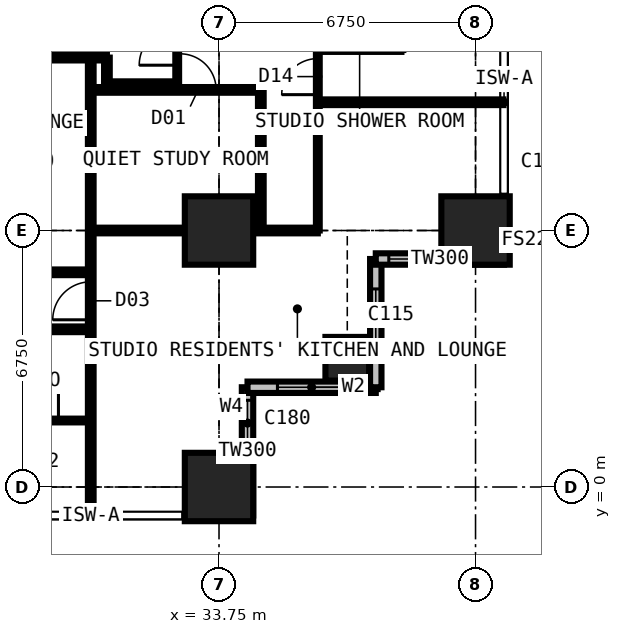
"""IFC4 building model, lengths in metres.
Left out: names, types, materials, properties, quantities, classifications, styles, units other than length and angle.
Written with IfcOpenShell. Run it as: python <this file> out.ifc"""

import sys

from ifc_helpers import new_model, si_unit, direction, frame, frame_2d, origin, origin_2d, place, context, subcontext, project, spatial, rectangle, extrude, element, fill, save


model = new_model("IFC4")
c1 = context("Model", 3, precision=1e-05, world=origin(), true_north=direction((0.0, 1.0)))
c2 = subcontext(c1, "Body", "Model", "MODEL_VIEW")
j1 = project(units=[si_unit("LENGTHUNIT", "METRE"), si_unit("PLANEANGLEUNIT", "RADIAN")], contexts=[c1])
p1 = place(None, origin())
s1 = spatial("IfcSite", under=j1, at=p1, CompositionType="ELEMENT")
p2 = place(p1, origin())
s2 = spatial("IfcBuilding", under=s1, at=p2, CompositionType="ELEMENT")
p3 = place(p2, frame((0.0, 0.0, 50.4)))
s3 = spatial("IfcBuildingStorey", under=s2, at=p3, CompositionType="ELEMENT", Elevation=50.4)
for number, where, z_axis, x_axis in (
    (1, (33.75, 0.0, 0.0), (0.0, 0.0, 1.0), (1.0, 0.0, 0.0)),
    (2, (33.75, 6.75, 0.0), (0.0, 0.0, 1.0), (1.0, 0.0, 0.0)),
):
    element("IfcColumn", number, at=place(p3, frame(where, z_axis=z_axis, x_axis=x_axis)), inside=s3, PredefinedType="COLUMN", context=c2, shape_type="SweptSolid", body=[
        extrude(rectangle(XDim=1.8, YDim=1.8, at=origin_2d()), origin(), (0.0, 0.0, 1.0), 3.6),
    ])
p4 = place(p3, frame((37.125, 3.375, 0.0), z_axis=(0.0, 0.0, 1.0), x_axis=(1.0, 0.0, 0.0)))
e3 = element("IfcColumn", 3, at=p4, inside=s3, PredefinedType="COLUMN", context=c2, shape_type="SweptSolid", body=[
    extrude(rectangle(XDim=1.15, YDim=1.15, at=origin_2d()), origin(), (0.0, 0.0, 1.0), 3.6),
])
p5 = place(p3, frame((40.5, 6.75, 0.0), z_axis=(0.0, 0.0, 1.0), x_axis=(1.0, 0.0, 0.0)))
e4 = element("IfcColumn", 4, at=p5, inside=s3, PredefinedType="COLUMN", context=c2, shape_type="SweptSolid", body=[
    extrude(rectangle(XDim=1.8, YDim=1.8, at=origin_2d()), origin(), (0.0, 0.0, 1.0), 3.6),
])
p6 = place(p3, frame((34.5, -0.75, 0.0), z_axis=(0.0, 0.0, 1.0), x_axis=(0.0, 1.0, 0.0)))
e5 = element("IfcWall", 5, at=p6, inside=s3, PredefinedType="SOLIDWALL", context=c2, shape_type="SweptSolid", body=[
    extrude(rectangle(XDim=3.375, YDim=0.3, at=frame_2d((1.688, 0.0))), origin(), (0.0, 0.0, 1.0), 3.375),
])
p7 = place(p6, frame((1.833, 0.0, 0.9)))
e6 = element("IfcOpeningElement", 6, at=p7, cuts=e5, PredefinedType="OPENING", context=c2, shape_type="SweptSolid", body=[
    extrude(rectangle(XDim=1.2, YDim=1.8, at=frame_2d((0.6, 0.9))), frame((0.0, 0.16, 0.0), z_axis=(0.0, -1.0, 0.0), x_axis=(1.0, 0.0, 0.0)), (0.0, 0.0, 1.0), 0.32),
])
p8 = place(p3, frame((34.5, 2.625, 0.0), z_axis=(0.0, 0.0, 1.0), x_axis=(1.0, 0.0, 0.0)))
e7 = element("IfcWall", 7, at=p8, inside=s3, PredefinedType="SOLIDWALL", context=c2, shape_type="SweptSolid", body=[
    extrude(rectangle(XDim=3.375, YDim=0.3, at=frame_2d((1.688, 0.0))), origin(), (0.0, 0.0, 1.0), 3.375),
])
p9 = place(p8, frame((0.788, 0.0, 0.6)))
e8 = element("IfcOpeningElement", 8, at=p9, cuts=e7, PredefinedType="OPENING", context=c2, shape_type="SweptSolid", body=[
    extrude(rectangle(XDim=1.8, YDim=2.1, at=frame_2d((0.9, 1.05))), frame((0.0, 0.16, 0.0), z_axis=(0.0, -1.0, 0.0), x_axis=(1.0, 0.0, 0.0)), (0.0, 0.0, 1.0), 0.32),
])
p10 = place(p3, frame((37.875, 2.625, 0.0), z_axis=(0.0, 0.0, 1.0), x_axis=(0.0, 1.0, 0.0)))
e9 = element("IfcWall", 9, at=p10, inside=s3, PredefinedType="SOLIDWALL", context=c2, shape_type="SweptSolid", body=[
    extrude(rectangle(XDim=3.375, YDim=0.3, at=frame_2d((1.688, 0.0))), origin(), (0.0, 0.0, 1.0), 3.375),
])
p11 = place(p10, frame((0.788, 0.0, 0.6)))
e10 = element("IfcOpeningElement", 10, at=p11, cuts=e9, PredefinedType="OPENING", context=c2, shape_type="SweptSolid", body=[
    extrude(rectangle(XDim=1.8, YDim=2.1, at=frame_2d((0.9, 1.05))), frame((0.0, 0.16, 0.0), z_axis=(0.0, -1.0, 0.0), x_axis=(1.0, 0.0, 0.0)), (0.0, 0.0, 1.0), 0.32),
])
p12 = place(p3, frame((37.875, 6.0, 0.0), z_axis=(0.0, 0.0, 1.0), x_axis=(1.0, 0.0, 0.0)))
e11 = element("IfcWall", 11, at=p12, inside=s3, PredefinedType="SOLIDWALL", context=c2, shape_type="SweptSolid", body=[
    extrude(rectangle(XDim=3.375, YDim=0.3, at=frame_2d((1.688, 0.0))), origin(), (0.0, 0.0, 1.0), 3.375),
])
p13 = place(p12, frame((0.343, 0.0, 0.9)))
e12 = element("IfcOpeningElement", 12, at=p13, cuts=e11, PredefinedType="OPENING", context=c2, shape_type="SweptSolid", body=[
    extrude(rectangle(XDim=1.2, YDim=1.8, at=frame_2d((0.6, 0.9))), frame((0.0, 0.16, 0.0), z_axis=(0.0, -1.0, 0.0), x_axis=(1.0, 0.0, 0.0)), (0.0, 0.0, 1.0), 0.32),
])
p14 = place(p3, frame((6.75, 4.15, 0.0), z_axis=(0.0, 0.0, 1.0), x_axis=(1.0, 0.0, 0.0)))
e13 = element("IfcWall", 13, at=p14, inside=s3, PredefinedType="PARTITIONING", context=c2, shape_type="SweptSolid", body=[
    extrude(rectangle(XDim=23.625, YDim=0.15, at=frame_2d((11.812, 0.0))), origin(), (0.0, 0.0, 1.0), 3.375),
])
p15 = place(p14, frame((0.2, 0.0, 0.0)))
e14 = element("IfcOpeningElement", 14, at=p15, cuts=e13, PredefinedType="OPENING", context=c2, shape_type="SweptSolid", body=[
    extrude(rectangle(XDim=0.95, YDim=2.2, at=frame_2d((0.475, 1.1))), frame((0.0, 0.085, 0.0), z_axis=(0.0, -1.0, 0.0), x_axis=(1.0, 0.0, 0.0)), (0.0, 0.0, 1.0), 0.17),
])
p16 = place(p14, frame((3.625, 0.0, 0.0)))
e15 = element("IfcOpeningElement", 15, at=p16, cuts=e13, PredefinedType="OPENING", context=c2, shape_type="SweptSolid", body=[
    extrude(rectangle(XDim=0.95, YDim=2.2, at=frame_2d((0.475, 1.1))), frame((0.0, 0.085, 0.0), z_axis=(0.0, -1.0, 0.0), x_axis=(1.0, 0.0, 0.0)), (0.0, 0.0, 1.0), 0.17),
])
p17 = place(p14, frame((18.475, 0.0, 0.0)))
e16 = element("IfcOpeningElement", 16, at=p17, cuts=e13, PredefinedType="OPENING", context=c2, shape_type="SweptSolid", body=[
    extrude(rectangle(XDim=0.95, YDim=2.2, at=frame_2d((0.475, 1.1))), frame((0.0, 0.085, 0.0), z_axis=(0.0, -1.0, 0.0), x_axis=(1.0, 0.0, 0.0)), (0.0, 0.0, 1.0), 0.17),
])
p18 = place(p14, frame((11.725, 0.0, 0.0)))
e17 = element("IfcOpeningElement", 17, at=p18, cuts=e13, PredefinedType="OPENING", context=c2, shape_type="SweptSolid", body=[
    extrude(rectangle(XDim=0.95, YDim=2.2, at=frame_2d((0.475, 1.1))), frame((0.0, 0.085, 0.0), z_axis=(0.0, -1.0, 0.0), x_axis=(1.0, 0.0, 0.0)), (0.0, 0.0, 1.0), 0.17),
])
p19 = place(p14, frame((6.95, 0.0, 0.0)))
e18 = element("IfcOpeningElement", 18, at=p19, cuts=e13, PredefinedType="OPENING", context=c2, shape_type="SweptSolid", body=[
    extrude(rectangle(XDim=0.95, YDim=2.2, at=frame_2d((0.475, 1.1))), frame((0.0, 0.085, 0.0), z_axis=(0.0, -1.0, 0.0), x_axis=(1.0, 0.0, 0.0)), (0.0, 0.0, 1.0), 0.17),
])
p20 = place(p3, frame((10.125, 11.3, 0.0), z_axis=(0.0, 0.0, 1.0), x_axis=(1.0, 0.0, 0.0)))
e19 = element("IfcWall", 19, at=p20, inside=s3, PredefinedType="PARTITIONING", context=c2, shape_type="SweptSolid", body=[
    extrude(rectangle(XDim=20.675, YDim=0.15, at=frame_2d((10.337, 0.0))), origin(), (0.0, 0.0, 1.0), 3.375),
])
p21 = place(p20, frame((1.775, 0.0, 0.0)))
e20 = element("IfcOpeningElement", 20, at=p21, cuts=e19, PredefinedType="OPENING", context=c2, shape_type="SweptSolid", body=[
    extrude(rectangle(XDim=1.0, YDim=2.2, at=frame_2d((0.5, 1.1))), frame((0.0, 0.085, 0.0), z_axis=(0.0, -1.0, 0.0), x_axis=(1.0, 0.0, 0.0)), (0.0, 0.0, 1.0), 0.17),
])
p22 = place(p20, frame((11.312, 0.0, 0.0)))
e21 = element("IfcOpeningElement", 21, at=p22, cuts=e19, PredefinedType="OPENING", context=c2, shape_type="SweptSolid", body=[
    extrude(rectangle(XDim=1.0, YDim=2.2, at=frame_2d((0.5, 1.1))), frame((0.0, 0.085, 0.0), z_axis=(0.0, -1.0, 0.0), x_axis=(1.0, 0.0, 0.0)), (0.0, 0.0, 1.0), 0.17),
])
p23 = place(p3, frame((22.988, 5.65, 0.0), z_axis=(0.0, 0.0, 1.0), x_axis=(1.0, 0.0, 0.0)))
e22 = element("IfcWall", 22, at=p23, inside=s3, PredefinedType="PARTITIONING", context=c2, shape_type="SweptSolid", body=[
    extrude(rectangle(XDim=7.387, YDim=0.15, at=frame_2d((3.694, 0.0))), origin(), (0.0, 0.0, 1.0), 3.375),
])
p24 = place(p23, frame((2.15, 0.0, 0.0)))
e23 = element("IfcOpeningElement", 23, at=p24, cuts=e22, PredefinedType="OPENING", context=c2, shape_type="SweptSolid", body=[
    extrude(rectangle(XDim=0.95, YDim=2.2, at=frame_2d((0.475, 1.1))), frame((0.0, 0.085, 0.0), z_axis=(0.0, -1.0, 0.0), x_axis=(1.0, 0.0, 0.0)), (0.0, 0.0, 1.0), 0.17),
])
p25 = place(p3, frame((27.775, 1.75, 0.0), z_axis=(0.0, 0.0, 1.0), x_axis=(1.0, 0.0, 0.0)))
e24 = element("IfcWall", 24, at=p25, inside=s3, PredefinedType="PARTITIONING", context=c2, shape_type="SweptSolid", body=[
    extrude(rectangle(XDim=2.6, YDim=0.1, at=frame_2d((1.3, 0.0))), origin(), (0.0, 0.0, 1.0), 3.375),
])
p26 = place(p25, frame((0.85, 0.0, 0.0)))
e25 = element("IfcOpeningElement", 25, at=p26, cuts=e24, PredefinedType="OPENING", context=c2, shape_type="SweptSolid", body=[
    extrude(rectangle(XDim=0.9, YDim=2.2, at=frame_2d((0.45, 1.1))), frame((0.0, 0.06, 0.0), z_axis=(0.0, -1.0, 0.0), x_axis=(1.0, 0.0, 0.0)), (0.0, 0.0, 1.0), 0.12),
])
p27 = place(p3, frame((30.375, -0.734, 0.0), z_axis=(0.0, 0.0, 1.0), x_axis=(0.0, 1.0, 0.0)))
e26 = element("IfcWall", 26, at=p27, inside=s3, PredefinedType="PARTITIONING", context=c2, shape_type="SweptSolid", body=[
    extrude(rectangle(XDim=12.034, YDim=0.15, at=frame_2d((6.017, 0.0))), origin(), (0.0, 0.0, 1.0), 3.375),
])
p28 = place(p27, frame((5.134, 0.0, 0.0)))
e27 = element("IfcOpeningElement", 27, at=p28, cuts=e26, PredefinedType="OPENING", context=c2, shape_type="SweptSolid", body=[
    extrude(rectangle(XDim=1.0, YDim=2.2, at=frame_2d((0.5, 1.1))), frame((0.0, 0.085, 0.0), z_axis=(0.0, -1.0, 0.0), x_axis=(1.0, 0.0, 0.0)), (0.0, 0.0, 1.0), 0.17),
])
p29 = place(p3, frame((30.375, 6.75, 0.0), z_axis=(0.0, 0.0, 1.0), x_axis=(1.0, 0.0, 0.0)))
e28 = element("IfcWall", 28, at=p29, inside=s3, PredefinedType="PARTITIONING", context=c2, shape_type="SweptSolid", body=[
    extrude(rectangle(XDim=5.975, YDim=0.15, at=frame_2d((2.988, 0.0))), origin(), (0.0, 0.0, 1.0), 2.877),
])
p30 = place(p3, frame((30.375, 10.45, 0.0), z_axis=(0.0, 0.0, 1.0), x_axis=(1.0, 0.0, 0.0)))
e29 = element("IfcWall", 29, at=p30, inside=s3, PredefinedType="PARTITIONING", context=c2, shape_type="SweptSolid", body=[
    extrude(rectangle(XDim=4.475, YDim=0.15, at=frame_2d((2.238, 0.0))), origin(), (0.0, 0.0, 1.0), 3.375),
])
p31 = place(p30, frame((2.35, 0.0, 0.0)))
e30 = element("IfcOpeningElement", 30, at=p31, cuts=e29, PredefinedType="OPENING", context=c2, shape_type="SweptSolid", body=[
    extrude(rectangle(XDim=0.95, YDim=2.2, at=frame_2d((0.475, 1.1))), frame((0.0, 0.085, 0.0), z_axis=(0.0, -1.0, 0.0), x_axis=(1.0, 0.0, 0.0)), (0.0, 0.0, 1.0), 0.17),
])
p32 = place(p3, frame((30.8, 10.6, 0.0), z_axis=(0.0, 0.0, 1.0), x_axis=(0.0, 1.0, 0.0)))
e31 = element("IfcWall", 31, at=p32, inside=s3, PredefinedType="PARTITIONING", context=c2, shape_type="SweptSolid", body=[
    extrude(rectangle(XDim=0.7, YDim=0.15, at=frame_2d((0.35, 0.0))), origin(), (0.0, 0.0, 1.0), 3.375),
])
p33 = place(p3, frame((30.8, 10.6, 0.0), z_axis=(0.0, 0.0, 1.0), x_axis=(1.0, 0.0, 0.0)))
e32 = element("IfcWall", 32, at=p33, inside=s3, PredefinedType="PARTITIONING", context=c2, shape_type="SweptSolid", body=[
    extrude(rectangle(XDim=1.85, YDim=0.15, at=frame_2d((0.925, 0.0))), origin(), (0.0, 0.0, 1.0), 3.375),
])
p34 = place(p3, frame((32.65, 10.6, 0.0), z_axis=(0.0, 0.0, 1.0), x_axis=(0.0, 1.0, 0.0)))
e33 = element("IfcWall", 33, at=p34, inside=s3, PredefinedType="SHEAR", context=c2, shape_type="SweptSolid", body=[
    extrude(rectangle(XDim=9.3, YDim=0.1, at=frame_2d((4.65, 0.0))), origin(), (0.0, 0.0, 1.0), 3.375),
])
p35 = place(p34, frame((0.5, 0.0, 0.0)))
e34 = element("IfcOpeningElement", 34, at=p35, cuts=e33, PredefinedType="OPENING", context=c2, shape_type="SweptSolid", body=[
    extrude(rectangle(XDim=1.0, YDim=2.2, at=frame_2d((0.5, 1.1))), frame((0.0, 0.06, 0.0), z_axis=(0.0, -1.0, 0.0), x_axis=(1.0, 0.0, 0.0)), (0.0, 0.0, 1.0), 0.12),
])
p36 = place(p3, frame((34.85, 6.75, 0.0), z_axis=(0.0, 0.0, 1.0), x_axis=(0.0, 1.0, 0.0)))
e35 = element("IfcWall", 35, at=p36, inside=s3, PredefinedType="PARTITIONING", context=c2, shape_type="SweptSolid", body=[
    extrude(rectangle(XDim=3.7, YDim=0.15, at=frame_2d((1.85, 0.0))), origin(), (0.0, 0.0, 1.0), 3.375),
])
p37 = place(p3, frame((36.35, 6.75, 0.0), z_axis=(0.0, 0.0, 1.0), x_axis=(0.0, 1.0, 0.0)))
e36 = element("IfcWall", 36, at=p37, inside=s3, PredefinedType="PARTITIONING", context=c2, shape_type="SweptSolid", body=[
    extrude(rectangle(XDim=23.625, YDim=0.1, at=frame_2d((11.812, 0.0))), origin(), (0.0, 0.0, 1.0), 3.375),
])
p38 = place(p37, frame((3.575, 0.0, 0.0)))
e37 = element("IfcOpeningElement", 37, at=p38, cuts=e36, PredefinedType="OPENING", context=c2, shape_type="SweptSolid", body=[
    extrude(rectangle(XDim=0.95, YDim=2.2, at=frame_2d((0.475, 1.1))), frame((0.0, 0.06, 0.0), z_axis=(0.0, -1.0, 0.0), x_axis=(1.0, 0.0, 0.0)), (0.0, 0.0, 1.0), 0.12),
])
p39 = place(p37, frame((7.0, 0.0, 0.0)))
e38 = element("IfcOpeningElement", 38, at=p39, cuts=e36, PredefinedType="OPENING", context=c2, shape_type="SweptSolid", body=[
    extrude(rectangle(XDim=0.95, YDim=2.2, at=frame_2d((0.475, 1.1))), frame((0.0, 0.06, 0.0), z_axis=(0.0, -1.0, 0.0), x_axis=(1.0, 0.0, 0.0)), (0.0, 0.0, 1.0), 0.12),
])
p40 = place(p37, frame((10.375, 0.0, 0.0)))
e39 = element("IfcOpeningElement", 39, at=p40, cuts=e36, PredefinedType="OPENING", context=c2, shape_type="SweptSolid", body=[
    extrude(rectangle(XDim=0.95, YDim=2.2, at=frame_2d((0.475, 1.1))), frame((0.0, 0.06, 0.0), z_axis=(0.0, -1.0, 0.0), x_axis=(1.0, 0.0, 0.0)), (0.0, 0.0, 1.0), 0.12),
])
p41 = place(p37, frame((13.75, 0.0, 0.0)))
e40 = element("IfcOpeningElement", 40, at=p41, cuts=e36, PredefinedType="OPENING", context=c2, shape_type="SweptSolid", body=[
    extrude(rectangle(XDim=0.95, YDim=2.2, at=frame_2d((0.475, 1.1))), frame((0.0, 0.06, 0.0), z_axis=(0.0, -1.0, 0.0), x_axis=(1.0, 0.0, 0.0)), (0.0, 0.0, 1.0), 0.12),
])
p42 = place(p37, frame((17.125, 0.0, 0.0)))
e41 = element("IfcOpeningElement", 41, at=p42, cuts=e36, PredefinedType="OPENING", context=c2, shape_type="SweptSolid", body=[
    extrude(rectangle(XDim=0.95, YDim=2.2, at=frame_2d((0.475, 1.1))), frame((0.0, 0.06, 0.0), z_axis=(0.0, -1.0, 0.0), x_axis=(1.0, 0.0, 0.0)), (0.0, 0.0, 1.0), 0.12),
])
p43 = place(p37, frame((20.5, 0.0, 0.0)))
e42 = element("IfcOpeningElement", 42, at=p43, cuts=e36, PredefinedType="OPENING", context=c2, shape_type="SweptSolid", body=[
    extrude(rectangle(XDim=0.95, YDim=2.2, at=frame_2d((0.475, 1.1))), frame((0.0, 0.06, 0.0), z_axis=(0.0, -1.0, 0.0), x_axis=(1.0, 0.0, 0.0)), (0.0, 0.0, 1.0), 0.12),
])
p44 = place(p3, frame((36.35, 10.125, 0.0), z_axis=(0.0, 0.0, 1.0), x_axis=(1.0, 0.0, 0.0)))
e43 = element("IfcWall", 43, at=p44, inside=s3, PredefinedType="PARTITIONING", context=c2, shape_type="SweptSolid", body=[
    extrude(rectangle(XDim=4.884, YDim=0.15, at=frame_2d((2.442, 0.0))), origin(), (0.0, 0.0, 1.0), 3.375),
])
p45 = place(p7, origin())
e44 = element("IfcWindow", 44, at=p45, inside=s3, PartitioningType="SINGLE_PANEL", PredefinedType="WINDOW", context=c2, shape_type="SweptSolid", body=[
    extrude(rectangle(XDim=1.2, YDim=1.8, at=frame_2d((0.6, 0.9))), frame((0.0, 0.03, 0.0), z_axis=(0.0, -1.0, 0.0), x_axis=(1.0, 0.0, 0.0)), (0.0, 0.0, 1.0), 0.06),
])
fill(e6, e44)
p46 = place(p9, origin())
e45 = element("IfcWindow", 45, at=p46, inside=s3, PartitioningType="SINGLE_PANEL", PredefinedType="WINDOW", context=c2, shape_type="SweptSolid", body=[
    extrude(rectangle(XDim=1.8, YDim=2.1, at=frame_2d((0.9, 1.05))), frame((0.0, 0.03, 0.0), z_axis=(0.0, -1.0, 0.0), x_axis=(1.0, 0.0, 0.0)), (0.0, 0.0, 1.0), 0.06),
])
fill(e8, e45)
p47 = place(p11, origin())
e46 = element("IfcWindow", 46, at=p47, inside=s3, PartitioningType="SINGLE_PANEL", PredefinedType="WINDOW", context=c2, shape_type="SweptSolid", body=[
    extrude(rectangle(XDim=1.8, YDim=2.1, at=frame_2d((0.9, 1.05))), frame((0.0, 0.03, 0.0), z_axis=(0.0, -1.0, 0.0), x_axis=(1.0, 0.0, 0.0)), (0.0, 0.0, 1.0), 0.06),
])
fill(e10, e46)
p48 = place(p13, origin())
e47 = element("IfcWindow", 47, at=p48, inside=s3, PartitioningType="SINGLE_PANEL", PredefinedType="WINDOW", context=c2, shape_type="SweptSolid", body=[
    extrude(rectangle(XDim=1.2, YDim=1.8, at=frame_2d((0.6, 0.9))), frame((0.0, 0.03, 0.0), z_axis=(0.0, -1.0, 0.0), x_axis=(1.0, 0.0, 0.0)), (0.0, 0.0, 1.0), 0.06),
])
fill(e12, e47)
p49 = place(p26, origin())
e48 = element("IfcDoor", 48, at=p49, inside=s3, OperationType="SINGLE_SWING_RIGHT", PredefinedType="DOOR", context=c2, shape_type="SweptSolid", body=[
    extrude(rectangle(XDim=0.9, YDim=2.2, at=frame_2d((0.45, 1.1))), frame((0.0, 0.025, 0.0), z_axis=(0.0, -1.0, 0.0), x_axis=(1.0, 0.0, 0.0)), (0.0, 0.0, 1.0), 0.05),
])
fill(e25, e48)
p50 = place(p28, origin())
e49 = element("IfcDoor", 49, at=p50, inside=s3, OperationType="SINGLE_SWING_LEFT", PredefinedType="DOOR", context=c2, shape_type="SweptSolid", body=[
    extrude(rectangle(XDim=1.0, YDim=2.2, at=frame_2d((0.5, 1.1))), frame((0.0, 0.025, 0.0), z_axis=(0.0, -1.0, 0.0), x_axis=(1.0, 0.0, 0.0)), (0.0, 0.0, 1.0), 0.05),
])
fill(e27, e49)
p51 = place(p38, origin())
e50 = element("IfcDoor", 50, at=p51, inside=s3, OperationType="SINGLE_SWING_LEFT", PredefinedType="DOOR", context=c2, shape_type="SweptSolid", body=[
    extrude(rectangle(XDim=0.95, YDim=2.2, at=frame_2d((0.475, 1.1))), frame((0.0, 0.025, 0.0), z_axis=(0.0, -1.0, 0.0), x_axis=(1.0, 0.0, 0.0)), (0.0, 0.0, 1.0), 0.05),
])
fill(e37, e50)
p52 = place(p35, origin())
e51 = element("IfcDoor", 51, at=p52, inside=s3, OperationType="SINGLE_SWING_LEFT", PredefinedType="DOOR", context=c2, shape_type="SweptSolid", body=[
    extrude(rectangle(XDim=1.0, YDim=2.2, at=frame_2d((0.5, 1.1))), frame((0.0, 0.025, 0.0), z_axis=(0.0, -1.0, 0.0), x_axis=(1.0, 0.0, 0.0)), (0.0, 0.0, 1.0), 0.05),
])
fill(e34, e51)
p53 = place(p31, origin())
e52 = element("IfcDoor", 52, at=p53, inside=s3, OperationType="SINGLE_SWING_LEFT", PredefinedType="DOOR", context=c2, shape_type="SweptSolid", body=[
    extrude(rectangle(XDim=0.95, YDim=2.2, at=frame_2d((0.475, 1.1))), frame((0.0, 0.025, 0.0), z_axis=(0.0, -1.0, 0.0), x_axis=(1.0, 0.0, 0.0)), (0.0, 0.0, 1.0), 0.05),
])
fill(e30, e52)
save(model, sys.argv[1])
